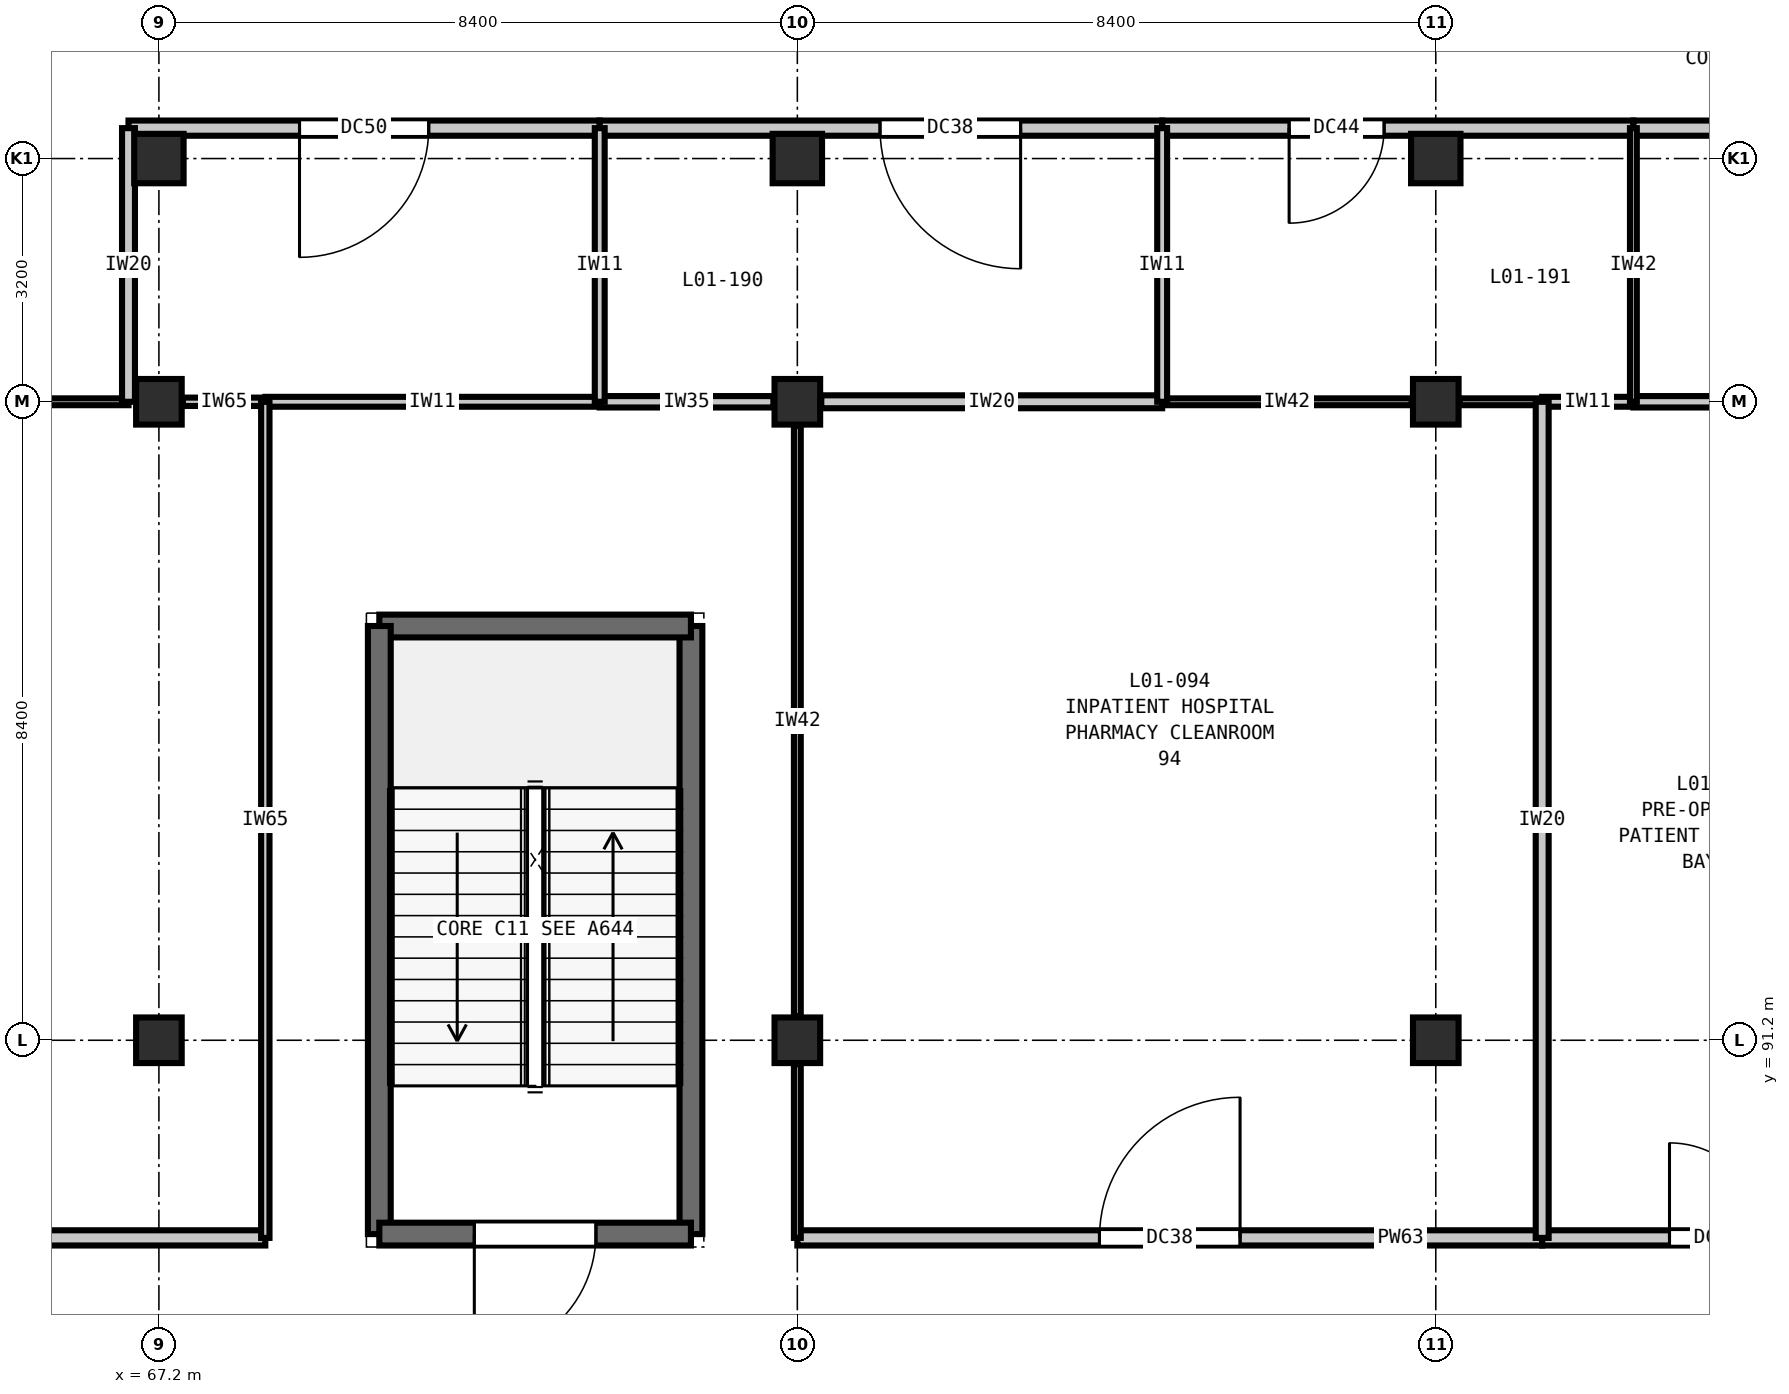
"""IFC4 building model, lengths in metres.
Left out: names, types, materials, properties, quantities, classifications, styles, units other than length and angle.
Written with IfcOpenShell. Run it as: python <this file> out.ifc"""

import sys

from ifc_helpers import new_model, si_unit, direction, frame, frame_2d, origin, origin_2d, place, context, subcontext, project, spatial, rectangle, extrude, element, fill, save


model = new_model("IFC4")
c1 = context("Model", 3, precision=1e-05, world=origin(), true_north=direction((0.0, 1.0)))
c2 = subcontext(c1, "Body", "Model", "MODEL_VIEW")
j1 = project(units=[si_unit("LENGTHUNIT", "METRE"), si_unit("PLANEANGLEUNIT", "RADIAN")], contexts=[c1])
p1 = place(None, origin())
s1 = spatial("IfcSite", under=j1, at=p1, CompositionType="ELEMENT")
p2 = place(p1, origin())
s2 = spatial("IfcBuilding", under=s1, at=p2, CompositionType="ELEMENT")
p3 = place(p2, frame((0.0, 0.0, 5.4)))
s3 = spatial("IfcBuildingStorey", under=s2, at=p3, CompositionType="ELEMENT", Elevation=5.4)
for number, where, z_axis, x_axis in (
    (1, (67.2, 91.2, 0.0), (0.0, 0.0, 1.0), (1.0, 0.0, 0.0)),
    (2, (67.2, 99.6, 0.0), (0.0, 0.0, 1.0), (1.0, 0.0, 0.0)),
):
    element("IfcColumn", number, at=place(p3, frame(where, z_axis=z_axis, x_axis=x_axis)), inside=s3, PredefinedType="COLUMN", context=c2, shape_type="SweptSolid", body=[
        extrude(rectangle(XDim=0.6, YDim=0.6, at=origin_2d()), origin(), (0.0, 0.0, 1.0), 5.4),
    ])
p4 = place(p3, frame((67.2, 102.8, 0.0), z_axis=(0.0, 0.0, 1.0), x_axis=(1.0, 0.0, 0.0)))
e3 = element("IfcColumn", 3, at=p4, inside=s3, PredefinedType="COLUMN", context=c2, shape_type="SweptSolid", body=[
    extrude(rectangle(XDim=0.65, YDim=0.65, at=origin_2d()), origin(), (0.0, 0.0, 1.0), 5.4),
])
for number, where, z_axis, x_axis in (
    (4, (75.6, 91.2, 0.0), (0.0, 0.0, 1.0), (1.0, 0.0, 0.0)),
    (5, (75.6, 99.6, 0.0), (0.0, 0.0, 1.0), (1.0, 0.0, 0.0)),
):
    element("IfcColumn", number, at=place(p3, frame(where, z_axis=z_axis, x_axis=x_axis)), inside=s3, PredefinedType="COLUMN", context=c2, shape_type="SweptSolid", body=[
        extrude(rectangle(XDim=0.6, YDim=0.6, at=origin_2d()), origin(), (0.0, 0.0, 1.0), 5.4),
    ])
p5 = place(p3, frame((75.6, 102.8, 0.0), z_axis=(0.0, 0.0, 1.0), x_axis=(1.0, 0.0, 0.0)))
e6 = element("IfcColumn", 6, at=p5, inside=s3, PredefinedType="COLUMN", context=c2, shape_type="SweptSolid", body=[
    extrude(rectangle(XDim=0.65, YDim=0.65, at=origin_2d()), origin(), (0.0, 0.0, 1.0), 5.4),
])
for number, where, z_axis, x_axis in (
    (7, (84.0, 91.2, 0.0), (0.0, 0.0, 1.0), (1.0, 0.0, 0.0)),
    (8, (84.0, 99.6, 0.0), (0.0, 0.0, 1.0), (1.0, 0.0, 0.0)),
):
    element("IfcColumn", number, at=place(p3, frame(where, z_axis=z_axis, x_axis=x_axis)), inside=s3, PredefinedType="COLUMN", context=c2, shape_type="SweptSolid", body=[
        extrude(rectangle(XDim=0.6, YDim=0.6, at=origin_2d()), origin(), (0.0, 0.0, 1.0), 5.4),
    ])
p6 = place(p3, frame((84.0, 102.8, 0.0), z_axis=(0.0, 0.0, 1.0), x_axis=(1.0, 0.0, 0.0)))
e9 = element("IfcColumn", 9, at=p6, inside=s3, PredefinedType="COLUMN", context=c2, shape_type="SweptSolid", body=[
    extrude(rectangle(XDim=0.65, YDim=0.65, at=origin_2d()), origin(), (0.0, 0.0, 1.0), 5.4),
])
p7 = place(p3, frame((74.2, 88.65, 0.0), z_axis=(0.0, 0.0, 1.0), x_axis=(0.0, 1.0, 0.0)))
e10 = element("IfcWall", 10, at=p7, inside=s3, PredefinedType="SHEAR", context=c2, shape_type="SweptSolid", body=[
    extrude(rectangle(XDim=8.0, YDim=0.3, at=frame_2d((4.0, 0.0))), origin(), (0.0, 0.0, 1.0), 5.4),
])
p8 = place(p3, frame((74.2, 96.65, 0.0), z_axis=(0.0, 0.0, 1.0), x_axis=(-1.0, 0.0, 0.0)))
e11 = element("IfcWall", 11, at=p8, inside=s3, PredefinedType="SHEAR", context=c2, shape_type="SweptSolid", body=[
    extrude(rectangle(XDim=4.1, YDim=0.3, at=frame_2d((2.05, 0.0))), origin(), (0.0, 0.0, 1.0), 5.4),
])
p9 = place(p3, frame((70.1, 96.65, 0.0), z_axis=(0.0, 0.0, 1.0), x_axis=(0.0, -1.0, 0.0)))
e12 = element("IfcWall", 12, at=p9, inside=s3, PredefinedType="SHEAR", context=c2, shape_type="SweptSolid", body=[
    extrude(rectangle(XDim=8.0, YDim=0.3, at=frame_2d((4.0, 0.0))), origin(), (0.0, 0.0, 1.0), 5.4),
])
p10 = place(p3, frame((70.1, 88.65, 0.0), z_axis=(0.0, 0.0, 1.0), x_axis=(1.0, 0.0, 0.0)))
e13 = element("IfcWall", 13, at=p10, inside=s3, PredefinedType="SHEAR", context=c2, shape_type="SweptSolid", body=[
    extrude(rectangle(XDim=4.1, YDim=0.3, at=frame_2d((2.05, 0.0))), origin(), (0.0, 0.0, 1.0), 5.4),
])
p11 = place(p10, frame((1.25, 0.0, 0.0)))
e14 = element("IfcOpeningElement", 14, at=p11, cuts=e13, PredefinedType="OPENING", context=c2, shape_type="SweptSolid", body=[
    extrude(rectangle(XDim=1.6, YDim=2.25, at=frame_2d((0.8, 1.125))), frame((0.0, 0.16, 0.0), z_axis=(0.0, -1.0, 0.0), x_axis=(1.0, 0.0, 0.0)), (0.0, 0.0, 1.0), 0.32),
])
p12 = place(p3, frame((58.8, 88.6, 0.0), z_axis=(0.0, 0.0, 1.0), x_axis=(1.0, 0.0, 0.0)))
e15 = element("IfcWall", 15, at=p12, inside=s3, PredefinedType="PARTITIONING", context=c2, shape_type="SweptSolid", body=[
    extrude(rectangle(XDim=9.8, YDim=0.2, at=frame_2d((4.9, 0.0))), origin(), (0.0, 0.0, 1.0), 5.05),
])
p13 = place(p12, frame((4.05, 0.0, 0.0)))
e16 = element("IfcOpeningElement", 16, at=p13, cuts=e15, PredefinedType="OPENING", context=c2, shape_type="SweptSolid", body=[
    extrude(rectangle(XDim=1.7, YDim=2.3, at=frame_2d((0.85, 1.15))), frame((0.0, 0.11, 0.0), z_axis=(0.0, -1.0, 0.0), x_axis=(1.0, 0.0, 0.0)), (0.0, 0.0, 1.0), 0.22),
])
p14 = place(p3, frame((75.6, 88.6, 0.0), z_axis=(0.0, 0.0, 1.0), x_axis=(1.0, 0.0, 0.0)))
e17 = element("IfcWall", 17, at=p14, inside=s3, PredefinedType="PARTITIONING", context=c2, shape_type="SweptSolid", body=[
    extrude(rectangle(XDim=9.8, YDim=0.2, at=frame_2d((4.9, 0.0))), origin(), (0.0, 0.0, 1.0), 5.05),
])
p15 = place(p14, frame((3.975, 0.0, 0.0)))
e18 = element("IfcOpeningElement", 18, at=p15, cuts=e17, PredefinedType="OPENING", context=c2, shape_type="SweptSolid", body=[
    extrude(rectangle(XDim=1.85, YDim=2.3, at=frame_2d((0.925, 1.15))), frame((0.0, 0.11, 0.0), z_axis=(0.0, -1.0, 0.0), x_axis=(1.0, 0.0, 0.0)), (0.0, 0.0, 1.0), 0.22),
])
p16 = place(p3, frame((85.4, 88.6, 0.0), z_axis=(0.0, 0.0, 1.0), x_axis=(1.0, 0.0, 0.0)))
e19 = element("IfcWall", 19, at=p16, inside=s3, PredefinedType="PARTITIONING", context=c2, shape_type="SweptSolid", body=[
    extrude(rectangle(XDim=4.6, YDim=0.2, at=frame_2d((2.3, 0.0))), origin(), (0.0, 0.0, 1.0), 5.05),
])
p17 = place(p16, frame((1.675, 0.0, 0.0)))
e20 = element("IfcOpeningElement", 20, at=p17, cuts=e19, PredefinedType="OPENING", context=c2, shape_type="SweptSolid", body=[
    extrude(rectangle(XDim=1.25, YDim=2.15, at=frame_2d((0.625, 1.075))), frame((0.0, 0.11, 0.0), z_axis=(0.0, -1.0, 0.0), x_axis=(1.0, 0.0, 0.0)), (0.0, 0.0, 1.0), 0.22),
])
p18 = place(p3, frame((63.6, 99.6, 0.0), z_axis=(0.0, 0.0, 1.0), x_axis=(1.0, 0.0, 0.0)))
e21 = element("IfcWall", 21, at=p18, inside=s3, PredefinedType="PARTITIONING", context=c2, shape_type="SweptSolid", body=[
    extrude(rectangle(XDim=3.2, YDim=0.09, at=frame_2d((1.6, 0.0))), origin(), (0.0, 0.0, 1.0), 4.685),
])
p19 = place(p3, frame((67.515, 99.6, 0.0), z_axis=(0.0, 0.0, 1.0), x_axis=(1.0, 0.0, 0.0)))
e22 = element("IfcWall", 22, at=p19, inside=s3, PredefinedType="PARTITIONING", context=c2, shape_type="SweptSolid", body=[
    extrude(rectangle(XDim=1.085, YDim=0.11, at=frame_2d((0.542, 0.0))), origin(), (0.0, 0.0, 1.0), 4.685),
])
p20 = place(p3, frame((68.6, 99.6, 0.0), z_axis=(0.0, 0.0, 1.0), x_axis=(1.0, 0.0, 0.0)))
e23 = element("IfcWall", 23, at=p20, inside=s3, PredefinedType="PARTITIONING", context=c2, shape_type="SweptSolid", body=[
    extrude(rectangle(XDim=4.4, YDim=0.13, at=frame_2d((2.2, 0.0))), origin(), (0.0, 0.0, 1.0), 4.685),
])
p21 = place(p3, frame((73.0, 99.6, 0.0), z_axis=(0.0, 0.0, 1.0), x_axis=(1.0, 0.0, 0.0)))
e24 = element("IfcWall", 24, at=p21, inside=s3, PredefinedType="PARTITIONING", context=c2, shape_type="SweptSolid", body=[
    extrude(rectangle(XDim=2.285, YDim=0.15, at=frame_2d((1.143, 0.0))), origin(), (0.0, 0.0, 1.0), 4.685),
])
p22 = place(p3, frame((75.915, 99.6, 0.0), z_axis=(0.0, 0.0, 1.0), x_axis=(1.0, 0.0, 0.0)))
e25 = element("IfcWall", 25, at=p22, inside=s3, PredefinedType="PARTITIONING", context=c2, shape_type="SweptSolid", body=[
    extrude(rectangle(XDim=4.485, YDim=0.17, at=frame_2d((2.242, 0.0))), origin(), (0.0, 0.0, 1.0), 4.685),
])
p23 = place(p3, frame((80.4, 99.6, 0.0), z_axis=(0.0, 0.0, 1.0), x_axis=(1.0, 0.0, 0.0)))
e26 = element("IfcWall", 26, at=p23, inside=s3, PredefinedType="PARTITIONING", context=c2, shape_type="SweptSolid", body=[
    extrude(rectangle(XDim=3.285, YDim=0.09, at=frame_2d((1.643, 0.0))), origin(), (0.0, 0.0, 1.0), 4.685),
])
p24 = place(p3, frame((84.315, 99.6, 0.0), z_axis=(0.0, 0.0, 1.0), x_axis=(1.0, 0.0, 0.0)))
e27 = element("IfcWall", 27, at=p24, inside=s3, PredefinedType="PARTITIONING", context=c2, shape_type="SweptSolid", body=[
    extrude(rectangle(XDim=1.085, YDim=0.09, at=frame_2d((0.542, 0.0))), origin(), (0.0, 0.0, 1.0), 4.685),
])
p25 = place(p3, frame((85.4, 99.6, 0.0), z_axis=(0.0, 0.0, 1.0), x_axis=(1.0, 0.0, 0.0)))
e28 = element("IfcWall", 28, at=p25, inside=s3, PredefinedType="PARTITIONING", context=c2, shape_type="SweptSolid", body=[
    extrude(rectangle(XDim=1.2, YDim=0.13, at=frame_2d((0.6, 0.0))), origin(), (0.0, 0.0, 1.0), 4.685),
])
p26 = place(p3, frame((86.6, 99.6, 0.0), z_axis=(0.0, 0.0, 1.0), x_axis=(1.0, 0.0, 0.0)))
e29 = element("IfcWall", 29, at=p26, inside=s3, PredefinedType="PARTITIONING", context=c2, shape_type="SweptSolid", body=[
    extrude(rectangle(XDim=3.4, YDim=0.15, at=frame_2d((1.7, 0.0))), origin(), (0.0, 0.0, 1.0), 4.685),
])
p27 = place(p3, frame((66.8, 103.2, 0.0), z_axis=(0.0, 0.0, 1.0), x_axis=(1.0, 0.0, 0.0)))
e30 = element("IfcWall", 30, at=p27, inside=s3, PredefinedType="PARTITIONING", context=c2, shape_type="SweptSolid", body=[
    extrude(rectangle(XDim=6.2, YDim=0.2, at=frame_2d((3.1, 0.0))), origin(), (0.0, 0.0, 1.0), 5.05),
])
p28 = place(p27, frame((2.25, 0.0, 0.0)))
e31 = element("IfcOpeningElement", 31, at=p28, cuts=e30, PredefinedType="OPENING", context=c2, shape_type="SweptSolid", body=[
    extrude(rectangle(XDim=1.7, YDim=2.3, at=frame_2d((0.85, 1.15))), frame((0.0, 0.11, 0.0), z_axis=(0.0, -1.0, 0.0), x_axis=(1.0, 0.0, 0.0)), (0.0, 0.0, 1.0), 0.22),
])
p29 = place(p3, frame((73.0, 103.2, 0.0), z_axis=(0.0, 0.0, 1.0), x_axis=(1.0, 0.0, 0.0)))
e32 = element("IfcWall", 32, at=p29, inside=s3, PredefinedType="PARTITIONING", context=c2, shape_type="SweptSolid", body=[
    extrude(rectangle(XDim=7.4, YDim=0.2, at=frame_2d((3.7, 0.0))), origin(), (0.0, 0.0, 1.0), 5.05),
])
p30 = place(p29, frame((3.688, 0.0, 0.0)))
e33 = element("IfcOpeningElement", 33, at=p30, cuts=e32, PredefinedType="OPENING", context=c2, shape_type="SweptSolid", body=[
    extrude(rectangle(XDim=1.85, YDim=2.3, at=frame_2d((0.925, 1.15))), frame((0.0, 0.11, 0.0), z_axis=(0.0, -1.0, 0.0), x_axis=(1.0, 0.0, 0.0)), (0.0, 0.0, 1.0), 0.22),
])
p31 = place(p3, frame((80.4, 103.2, 0.0), z_axis=(0.0, 0.0, 1.0), x_axis=(1.0, 0.0, 0.0)))
e34 = element("IfcWall", 34, at=p31, inside=s3, PredefinedType="PARTITIONING", context=c2, shape_type="SweptSolid", body=[
    extrude(rectangle(XDim=6.2, YDim=0.2, at=frame_2d((3.1, 0.0))), origin(), (0.0, 0.0, 1.0), 5.05),
])
p32 = place(p31, frame((1.67, 0.0, 0.0)))
e35 = element("IfcOpeningElement", 35, at=p32, cuts=e34, PredefinedType="OPENING", context=c2, shape_type="SweptSolid", body=[
    extrude(rectangle(XDim=1.25, YDim=2.15, at=frame_2d((0.625, 1.075))), frame((0.0, 0.11, 0.0), z_axis=(0.0, -1.0, 0.0), x_axis=(1.0, 0.0, 0.0)), (0.0, 0.0, 1.0), 0.22),
])
p33 = place(p3, frame((86.6, 103.2, 0.0), z_axis=(0.0, 0.0, 1.0), x_axis=(1.0, 0.0, 0.0)))
e36 = element("IfcWall", 36, at=p33, inside=s3, PredefinedType="PARTITIONING", context=c2, shape_type="SweptSolid", body=[
    extrude(rectangle(XDim=7.4, YDim=0.2, at=frame_2d((3.7, 0.0))), origin(), (0.0, 0.0, 1.0), 5.05),
])
p34 = place(p33, frame((3.05, 0.0, 0.0)))
e37 = element("IfcOpeningElement", 37, at=p34, cuts=e36, PredefinedType="OPENING", context=c2, shape_type="SweptSolid", body=[
    extrude(rectangle(XDim=1.3, YDim=2.2, at=frame_2d((0.65, 1.1))), frame((0.0, 0.11, 0.0), z_axis=(0.0, -1.0, 0.0), x_axis=(1.0, 0.0, 0.0)), (0.0, 0.0, 1.0), 0.22),
])
p35 = place(p3, frame((66.8, 99.6, 0.0), z_axis=(0.0, 0.0, 1.0), x_axis=(0.0, 1.0, 0.0)))
e38 = element("IfcWall", 38, at=p35, inside=s3, PredefinedType="PARTITIONING", context=c2, shape_type="SweptSolid", body=[
    extrude(rectangle(XDim=3.6, YDim=0.17, at=frame_2d((1.8, 0.0))), origin(), (0.0, 0.0, 1.0), 5.05),
])
p36 = place(p3, frame((68.6, 88.6, 0.0), z_axis=(0.0, 0.0, 1.0), x_axis=(0.0, 1.0, 0.0)))
e39 = element("IfcWall", 39, at=p36, inside=s3, PredefinedType="PARTITIONING", context=c2, shape_type="SweptSolid", body=[
    extrude(rectangle(XDim=11.0, YDim=0.11, at=frame_2d((5.5, 0.0))), origin(), (0.0, 0.0, 1.0), 5.05),
])
p37 = place(p3, frame((73.0, 99.6, 0.0), z_axis=(0.0, 0.0, 1.0), x_axis=(0.0, 1.0, 0.0)))
e40 = element("IfcWall", 40, at=p37, inside=s3, PredefinedType="PARTITIONING", context=c2, shape_type="SweptSolid", body=[
    extrude(rectangle(XDim=3.6, YDim=0.13, at=frame_2d((1.8, 0.0))), origin(), (0.0, 0.0, 1.0), 5.05),
])
p38 = place(p3, frame((75.6, 91.515, 0.0), z_axis=(0.0, 0.0, 1.0), x_axis=(0.0, 1.0, 0.0)))
e41 = element("IfcWall", 41, at=p38, inside=s3, PredefinedType="PARTITIONING", context=c2, shape_type="SweptSolid", body=[
    extrude(rectangle(XDim=7.77, YDim=0.09, at=frame_2d((3.885, 0.0))), origin(), (0.0, 0.0, 1.0), 4.735),
])
p39 = place(p3, frame((75.6, 88.6, 0.0), z_axis=(0.0, 0.0, 1.0), x_axis=(0.0, 1.0, 0.0)))
e42 = element("IfcWall", 42, at=p39, inside=s3, PredefinedType="PARTITIONING", context=c2, shape_type="SweptSolid", body=[
    extrude(rectangle(XDim=2.285, YDim=0.09, at=frame_2d((1.143, 0.0))), origin(), (0.0, 0.0, 1.0), 4.735),
])
p40 = place(p3, frame((80.4, 99.6, 0.0), z_axis=(0.0, 0.0, 1.0), x_axis=(0.0, 1.0, 0.0)))
e43 = element("IfcWall", 43, at=p40, inside=s3, PredefinedType="PARTITIONING", context=c2, shape_type="SweptSolid", body=[
    extrude(rectangle(XDim=3.6, YDim=0.13, at=frame_2d((1.8, 0.0))), origin(), (0.0, 0.0, 1.0), 5.05),
])
p41 = place(p3, frame((85.4, 88.6, 0.0), z_axis=(0.0, 0.0, 1.0), x_axis=(0.0, 1.0, 0.0)))
e44 = element("IfcWall", 44, at=p41, inside=s3, PredefinedType="PARTITIONING", context=c2, shape_type="SweptSolid", body=[
    extrude(rectangle(XDim=11.0, YDim=0.17, at=frame_2d((5.5, 0.0))), origin(), (0.0, 0.0, 1.0), 5.05),
])
p42 = place(p3, frame((86.6, 99.6, 0.0), z_axis=(0.0, 0.0, 1.0), x_axis=(0.0, 1.0, 0.0)))
e45 = element("IfcWall", 45, at=p42, inside=s3, PredefinedType="PARTITIONING", context=c2, shape_type="SweptSolid", body=[
    extrude(rectangle(XDim=3.6, YDim=0.09, at=frame_2d((1.8, 0.0))), origin(), (0.0, 0.0, 1.0), 5.05),
])
p43 = place(p11, frame((1.6, 0.0, 0.0), z_axis=(0.0, 0.0, 1.0), x_axis=(-1.0, 0.0, 0.0)))
e46 = element("IfcDoor", 46, at=p43, inside=s3, OperationType="SINGLE_SWING_RIGHT", PredefinedType="DOOR", context=c2, shape_type="SweptSolid", body=[
    extrude(rectangle(XDim=1.6, YDim=2.25, at=frame_2d((0.8, 1.125))), frame((0.0, 0.025, 0.0), z_axis=(0.0, -1.0, 0.0), x_axis=(1.0, 0.0, 0.0)), (0.0, 0.0, 1.0), 0.05),
])
fill(e14, e46)
p44 = place(p15, origin())
e47 = element("IfcDoor", 47, at=p44, inside=s3, OperationType="SINGLE_SWING_RIGHT", PredefinedType="DOOR", context=c2, shape_type="SweptSolid", body=[
    extrude(rectangle(XDim=1.85, YDim=2.3, at=frame_2d((0.925, 1.15))), frame((0.0, 0.025, 0.0), z_axis=(0.0, -1.0, 0.0), x_axis=(1.0, 0.0, 0.0)), (0.0, 0.0, 1.0), 0.05),
])
fill(e18, e47)
p45 = place(p17, origin())
e48 = element("IfcDoor", 48, at=p45, inside=s3, OperationType="SINGLE_SWING_LEFT", PredefinedType="DOOR", context=c2, shape_type="SweptSolid", body=[
    extrude(rectangle(XDim=1.25, YDim=2.15, at=frame_2d((0.625, 1.075))), frame((0.0, 0.025, 0.0), z_axis=(0.0, -1.0, 0.0), x_axis=(1.0, 0.0, 0.0)), (0.0, 0.0, 1.0), 0.05),
])
fill(e20, e48)
p46 = place(p28, frame((1.7, 0.0, 0.0), z_axis=(0.0, 0.0, 1.0), x_axis=(-1.0, 0.0, 0.0)))
e49 = element("IfcDoor", 49, at=p46, inside=s3, OperationType="SINGLE_SWING_RIGHT", PredefinedType="DOOR", context=c2, shape_type="SweptSolid", body=[
    extrude(rectangle(XDim=1.7, YDim=2.3, at=frame_2d((0.85, 1.15))), frame((0.0, 0.025, 0.0), z_axis=(0.0, -1.0, 0.0), x_axis=(1.0, 0.0, 0.0)), (0.0, 0.0, 1.0), 0.05),
])
fill(e31, e49)
p47 = place(p30, frame((1.85, 0.0, 0.0), z_axis=(0.0, 0.0, 1.0), x_axis=(-1.0, 0.0, 0.0)))
e50 = element("IfcDoor", 50, at=p47, inside=s3, OperationType="SINGLE_SWING_LEFT", PredefinedType="DOOR", context=c2, shape_type="SweptSolid", body=[
    extrude(rectangle(XDim=1.85, YDim=2.3, at=frame_2d((0.925, 1.15))), frame((0.0, 0.025, 0.0), z_axis=(0.0, -1.0, 0.0), x_axis=(1.0, 0.0, 0.0)), (0.0, 0.0, 1.0), 0.05),
])
fill(e33, e50)
p48 = place(p32, frame((1.25, 0.0, 0.0), z_axis=(0.0, 0.0, 1.0), x_axis=(-1.0, 0.0, 0.0)))
e51 = element("IfcDoor", 51, at=p48, inside=s3, OperationType="SINGLE_SWING_RIGHT", PredefinedType="DOOR", context=c2, shape_type="SweptSolid", body=[
    extrude(rectangle(XDim=1.25, YDim=2.15, at=frame_2d((0.625, 1.075))), frame((0.0, 0.025, 0.0), z_axis=(0.0, -1.0, 0.0), x_axis=(1.0, 0.0, 0.0)), (0.0, 0.0, 1.0), 0.05),
])
fill(e35, e51)
save(model, sys.argv[1])
